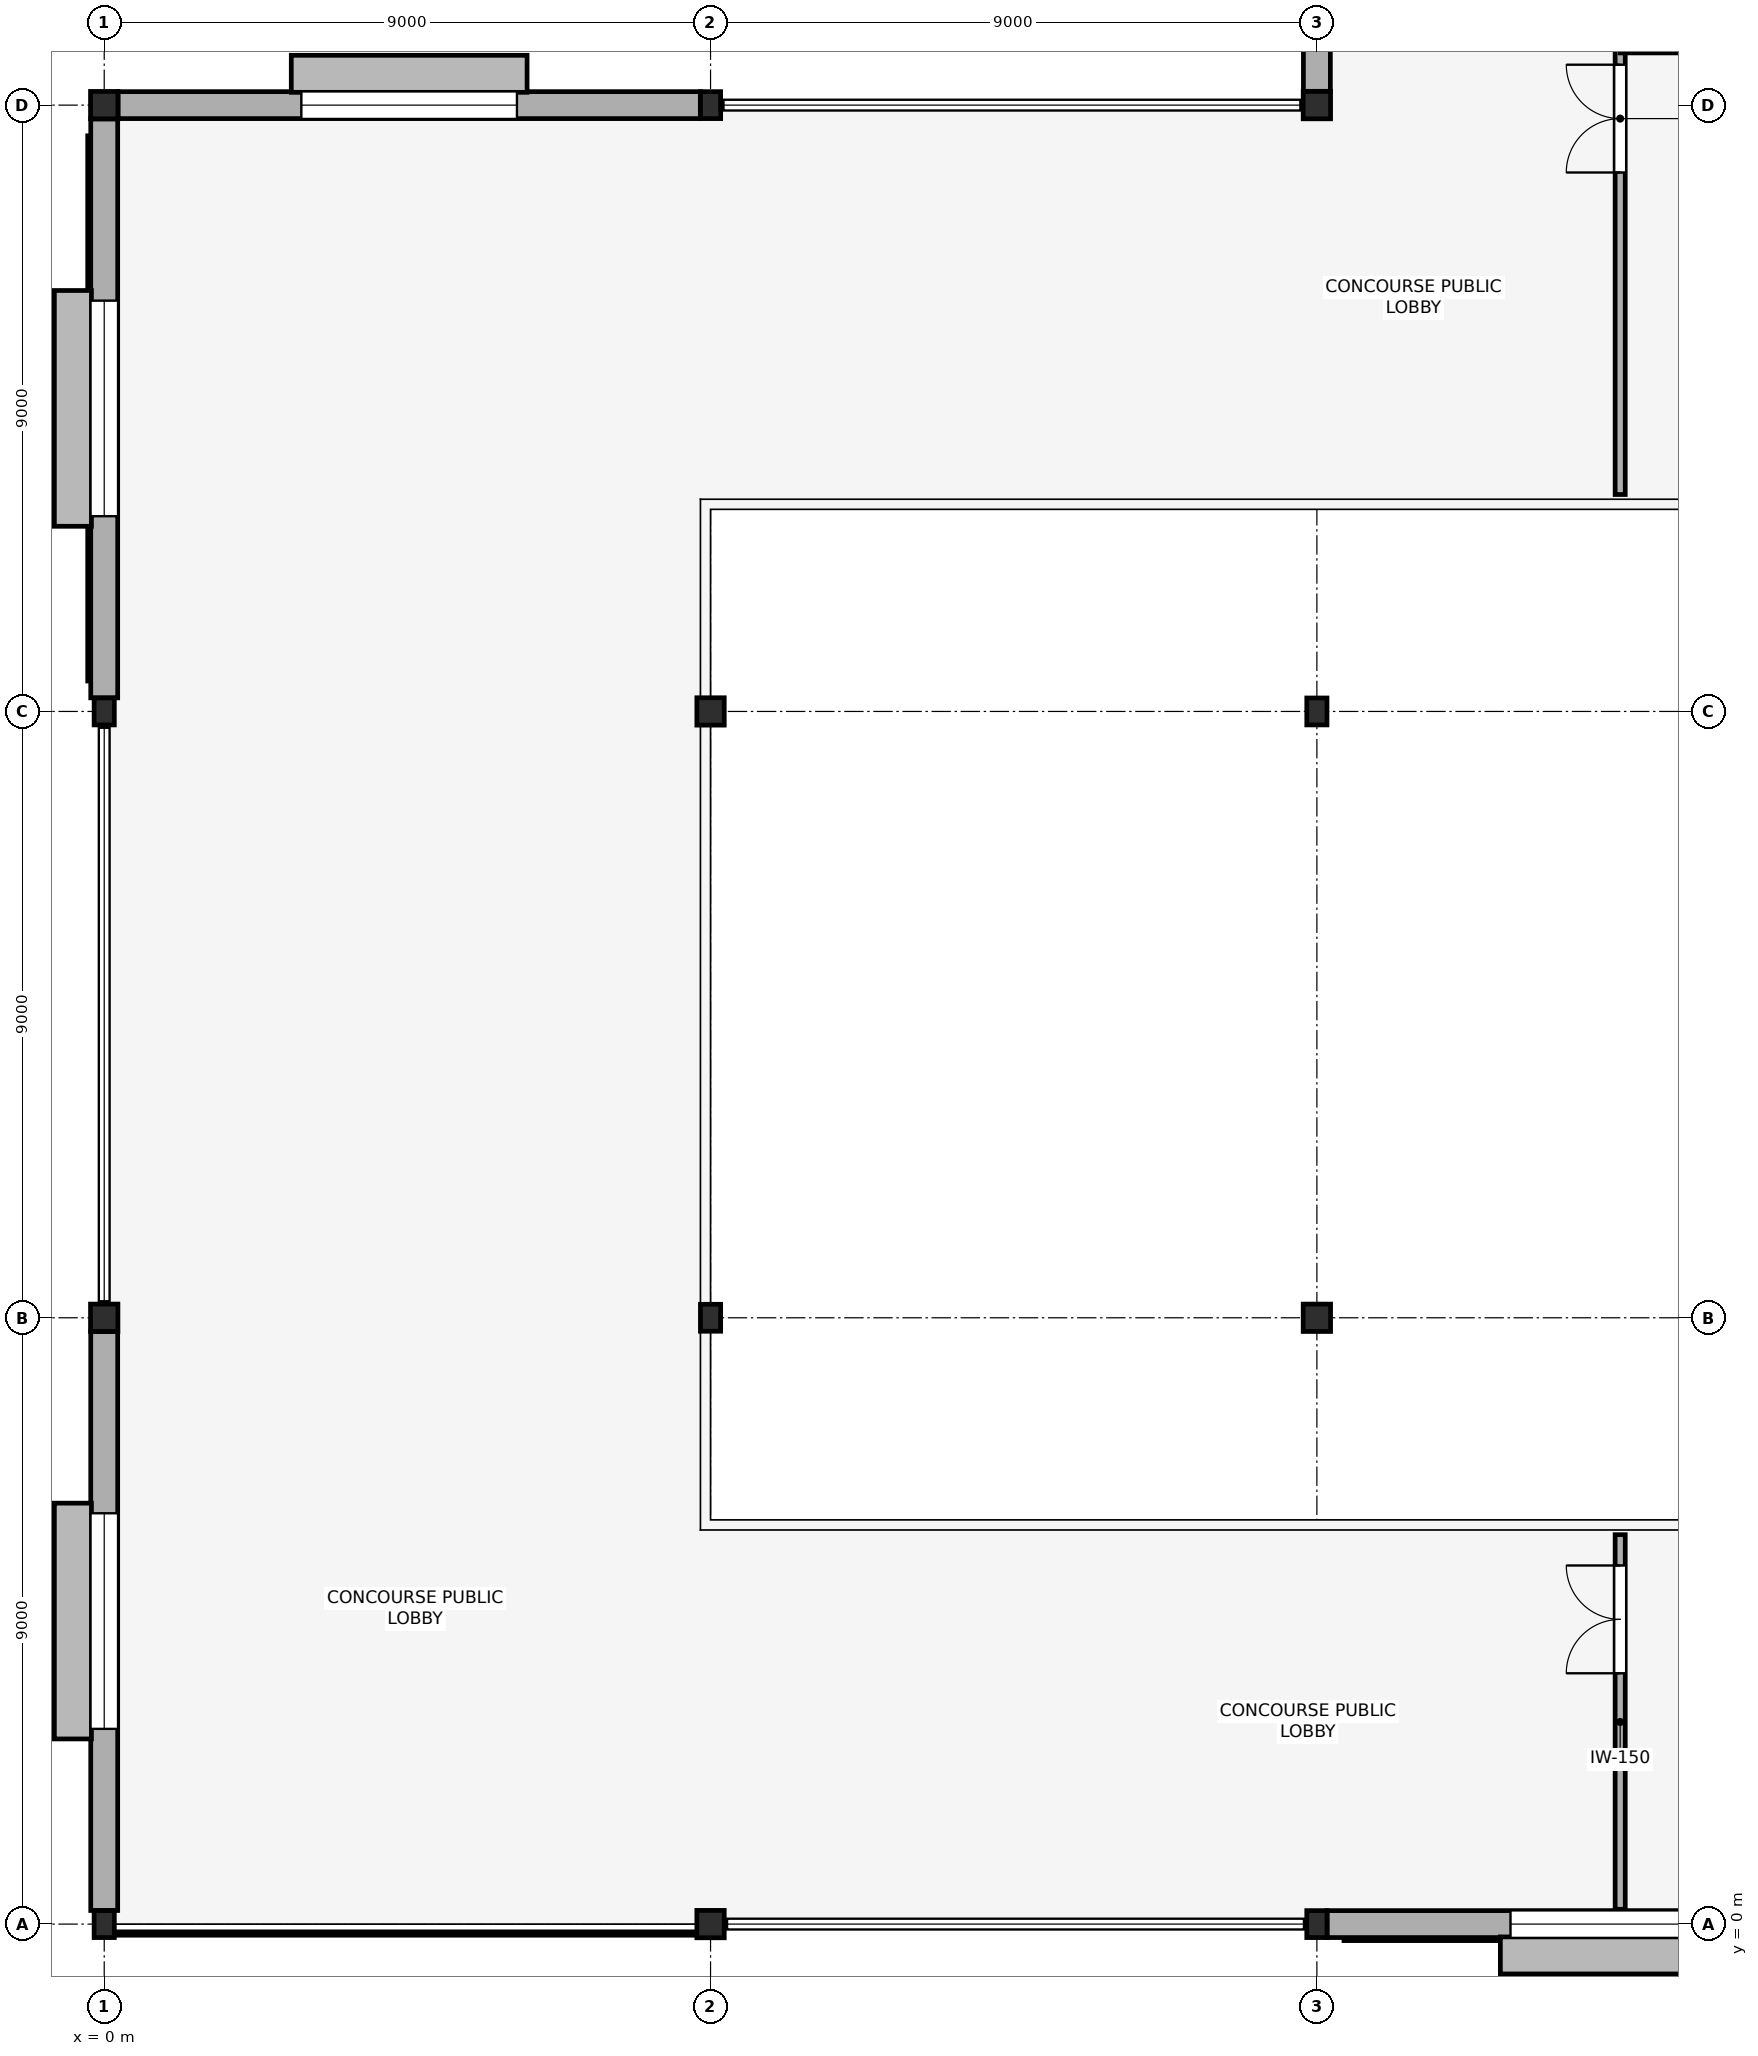
"""IFC4 building model, lengths in metres.
Left out: names, types, materials, properties, quantities, classifications, styles, units other than length and angle.
Written with IfcOpenShell. Run it as: python <this file> out.ifc"""

import sys

from ifc_helpers import new_model, si_unit, direction, frame, frame_2d, origin, origin_with_axes, origin_2d, place, context, subcontext, project, spatial, rectangle, hollow_circle, i_section, extrude, element, fill, save


model = new_model("IFC4")
c1 = context("Model", 3, precision=1e-05, world=origin(), true_north=direction((0.0, 1.0)))
c2 = subcontext(c1, "Body", "Model", "MODEL_VIEW")
j1 = project(units=[si_unit("LENGTHUNIT", "METRE"), si_unit("PLANEANGLEUNIT", "RADIAN")], contexts=[c1])
p1 = place(None, origin())
s1 = spatial("IfcSite", under=j1, at=p1, CompositionType="ELEMENT")
p2 = place(p1, origin())
s2 = spatial("IfcBuilding", under=s1, at=p2, CompositionType="ELEMENT")
p3 = place(p2, frame((0.0, 0.0, 5.4)))
s3 = spatial("IfcBuildingStorey", under=s2, at=p3, CompositionType="ELEMENT", Elevation=5.4)
p4 = place(p3, origin_with_axes())
e1 = element("IfcColumn", 1, at=p4, inside=s3, PredefinedType="COLUMN", context=c2, shape_type="SweptSolid", body=[
    extrude(i_section(OverallWidth=0.3, OverallDepth=0.4, WebThickness=0.013, FlangeThickness=0.024, FilletRadius=0.027, at=origin_2d()), origin(), (0.0, 0.0, 1.0), 4.8),
])
p5 = place(p3, frame((0.0, 9.0, 0.0), z_axis=(0.0, 0.0, 1.0), x_axis=(1.0, 0.0, 0.0)))
e2 = element("IfcColumn", 2, at=p5, inside=s3, PredefinedType="COLUMN", context=c2, shape_type="SweptSolid", body=[
    extrude(hollow_circle(Radius=0.203, WallThickness=0.016, at=origin_2d()), origin(), (0.0, 0.0, 1.0), 4.8),
])
p6 = place(p3, frame((0.0, 18.0, 0.0), z_axis=(0.0, 0.0, 1.0), x_axis=(1.0, 0.0, 0.0)))
e3 = element("IfcColumn", 3, at=p6, inside=s3, PredefinedType="COLUMN", context=c2, shape_type="SweptSolid", body=[
    extrude(i_section(OverallWidth=0.3, OverallDepth=0.4, WebThickness=0.013, FlangeThickness=0.024, FilletRadius=0.027, at=origin_2d()), origin(), (0.0, 0.0, 1.0), 4.8),
])
for number, where, z_axis, x_axis in (
    (4, (0.0, 27.0, 0.0), (0.0, 0.0, 1.0), (1.0, 0.0, 0.0)),
    (5, (9.0, 0.0, 0.0), (0.0, 0.0, 1.0), (1.0, 0.0, 0.0)),
):
    element("IfcColumn", number, at=place(p3, frame(where, z_axis=z_axis, x_axis=x_axis)), inside=s3, PredefinedType="COLUMN", context=c2, shape_type="SweptSolid", body=[
        extrude(hollow_circle(Radius=0.203, WallThickness=0.016, at=origin_2d()), origin(), (0.0, 0.0, 1.0), 4.8),
    ])
p7 = place(p3, frame((9.0, 9.0, 0.0), z_axis=(0.0, 0.0, 1.0), x_axis=(1.0, 0.0, 0.0)))
e6 = element("IfcColumn", 6, at=p7, inside=s3, PredefinedType="COLUMN", context=c2, shape_type="SweptSolid", body=[
    extrude(i_section(OverallWidth=0.3, OverallDepth=0.4, WebThickness=0.013, FlangeThickness=0.024, FilletRadius=0.027, at=origin_2d()), origin(), (0.0, 0.0, 1.0), 4.8),
])
p8 = place(p3, frame((9.0, 18.0, 0.0), z_axis=(0.0, 0.0, 1.0), x_axis=(1.0, 0.0, 0.0)))
e7 = element("IfcColumn", 7, at=p8, inside=s3, PredefinedType="COLUMN", context=c2, shape_type="SweptSolid", body=[
    extrude(hollow_circle(Radius=0.203, WallThickness=0.016, at=origin_2d()), origin(), (0.0, 0.0, 1.0), 4.8),
])
for number, where, z_axis, x_axis in (
    (8, (9.0, 27.0, 0.0), (0.0, 0.0, 1.0), (1.0, 0.0, 0.0)),
    (9, (18.0, 0.0, 0.0), (0.0, 0.0, 1.0), (1.0, 0.0, 0.0)),
):
    element("IfcColumn", number, at=place(p3, frame(where, z_axis=z_axis, x_axis=x_axis)), inside=s3, PredefinedType="COLUMN", context=c2, shape_type="SweptSolid", body=[
        extrude(i_section(OverallWidth=0.3, OverallDepth=0.4, WebThickness=0.013, FlangeThickness=0.024, FilletRadius=0.027, at=origin_2d()), origin(), (0.0, 0.0, 1.0), 4.8),
    ])
p9 = place(p3, frame((18.0, 9.0, 0.0), z_axis=(0.0, 0.0, 1.0), x_axis=(1.0, 0.0, 0.0)))
e10 = element("IfcColumn", 10, at=p9, inside=s3, PredefinedType="COLUMN", context=c2, shape_type="SweptSolid", body=[
    extrude(hollow_circle(Radius=0.203, WallThickness=0.016, at=origin_2d()), origin(), (0.0, 0.0, 1.0), 4.8),
])
p10 = place(p3, frame((18.0, 18.0, 0.0), z_axis=(0.0, 0.0, 1.0), x_axis=(1.0, 0.0, 0.0)))
e11 = element("IfcColumn", 11, at=p10, inside=s3, PredefinedType="COLUMN", context=c2, shape_type="SweptSolid", body=[
    extrude(i_section(OverallWidth=0.3, OverallDepth=0.4, WebThickness=0.013, FlangeThickness=0.024, FilletRadius=0.027, at=origin_2d()), origin(), (0.0, 0.0, 1.0), 4.8),
])
p11 = place(p3, frame((18.0, 27.0, 0.0), z_axis=(0.0, 0.0, 1.0), x_axis=(1.0, 0.0, 0.0)))
e12 = element("IfcColumn", 12, at=p11, inside=s3, PredefinedType="COLUMN", context=c2, shape_type="SweptSolid", body=[
    extrude(hollow_circle(Radius=0.203, WallThickness=0.016, at=origin_2d()), origin(), (0.0, 0.0, 1.0), 4.8),
])
p12 = place(p3, frame((26.795, 0.0, 0.0), z_axis=(0.0, 0.0, 1.0), x_axis=(-1.0, 0.0, 0.0)))
e13 = element("IfcWall", 13, at=p12, inside=s3, PredefinedType="STANDARD", context=c2, shape_type="SweptSolid", body=[
    extrude(rectangle(XDim=8.643, YDim=0.4, at=frame_2d((4.321, 0.0))), origin(), (0.0, 0.0, 1.0), 3.907),
])
p13 = place(p12, frame((2.721, 0.0, 0.95)))
e14 = element("IfcOpeningElement", 14, at=p13, cuts=e13, PredefinedType="OPENING", context=c2, shape_type="SweptSolid", body=[
    extrude(rectangle(XDim=3.2, YDim=1.8, at=frame_2d((1.6, 0.9))), frame((0.0, 0.21, 0.0), z_axis=(0.0, -1.0, 0.0), x_axis=(1.0, 0.0, 0.0)), (0.0, 0.0, 1.0), 0.42),
])
p14 = place(p3, frame((0.0, 0.202, 0.0), z_axis=(0.0, 0.0, 1.0), x_axis=(0.0, 1.0, 0.0)))
e15 = element("IfcWall", 15, at=p14, inside=s3, PredefinedType="STANDARD", context=c2, shape_type="SweptSolid", body=[
    extrude(rectangle(XDim=8.593, YDim=0.4, at=frame_2d((4.296, 0.0))), origin(), (0.0, 0.0, 1.0), 4.215),
])
p15 = place(p14, frame((2.696, 0.0, 0.95)))
e16 = element("IfcOpeningElement", 16, at=p15, cuts=e15, PredefinedType="OPENING", context=c2, shape_type="SweptSolid", body=[
    extrude(rectangle(XDim=3.2, YDim=1.8, at=frame_2d((1.6, 0.9))), frame((0.0, 0.21, 0.0), z_axis=(0.0, -1.0, 0.0), x_axis=(1.0, 0.0, 0.0)), (0.0, 0.0, 1.0), 0.42),
])
p16 = place(p3, frame((0.0, 18.202, 0.0), z_axis=(0.0, 0.0, 1.0), x_axis=(0.0, 1.0, 0.0)))
e17 = element("IfcWall", 17, at=p16, inside=s3, PredefinedType="STANDARD", context=c2, shape_type="SweptSolid", body=[
    extrude(rectangle(XDim=8.593, YDim=0.4, at=frame_2d((4.296, 0.0))), origin(), (0.0, 0.0, 1.0), 4.215),
])
p17 = place(p16, frame((2.696, 0.0, 0.95)))
e18 = element("IfcOpeningElement", 18, at=p17, cuts=e17, PredefinedType="OPENING", context=c2, shape_type="SweptSolid", body=[
    extrude(rectangle(XDim=3.2, YDim=1.8, at=frame_2d((1.6, 0.9))), frame((0.0, 0.21, 0.0), z_axis=(0.0, -1.0, 0.0), x_axis=(1.0, 0.0, 0.0)), (0.0, 0.0, 1.0), 0.42),
])
p18 = place(p3, frame((0.205, 27.0, 0.0), z_axis=(0.0, 0.0, 1.0), x_axis=(1.0, 0.0, 0.0)))
e19 = element("IfcWall", 19, at=p18, inside=s3, PredefinedType="STANDARD", context=c2, shape_type="SweptSolid", body=[
    extrude(rectangle(XDim=8.643, YDim=0.4, at=frame_2d((4.321, 0.0))), origin(), (0.0, 0.0, 1.0), 3.907),
])
p19 = place(p18, frame((2.721, 0.0, 0.95)))
e20 = element("IfcOpeningElement", 20, at=p19, cuts=e19, PredefinedType="OPENING", context=c2, shape_type="SweptSolid", body=[
    extrude(rectangle(XDim=3.2, YDim=1.8, at=frame_2d((1.6, 0.9))), frame((0.0, 0.21, 0.0), z_axis=(0.0, -1.0, 0.0), x_axis=(1.0, 0.0, 0.0)), (0.0, 0.0, 1.0), 0.42),
])
p20 = place(p3, frame((18.0, 27.205, 0.0), z_axis=(0.0, 0.0, 1.0), x_axis=(0.0, 1.0, 0.0)))
e21 = element("IfcWall", 21, at=p20, inside=s3, PredefinedType="STANDARD", context=c2, shape_type="SweptSolid", body=[
    extrude(rectangle(XDim=8.663, YDim=0.4, at=frame_2d((4.332, 0.0))), origin(), (0.0, 0.0, 1.0), 4.215),
])
p21 = place(p20, frame((2.731, 0.0, 0.95)))
e22 = element("IfcOpeningElement", 22, at=p21, cuts=e21, PredefinedType="OPENING", context=c2, shape_type="SweptSolid", body=[
    extrude(rectangle(XDim=3.2, YDim=1.8, at=frame_2d((1.6, 0.9))), frame((0.0, 0.21, 0.0), z_axis=(0.0, -1.0, 0.0), x_axis=(1.0, 0.0, 0.0)), (0.0, 0.0, 1.0), 0.42),
])
p22 = place(p3, frame((22.502, 0.22, 0.0), z_axis=(0.0, 0.0, 1.0), x_axis=(0.0, 1.0, 0.0)))
e23 = element("IfcWall", 23, at=p22, inside=s3, PredefinedType="PARTITIONING", context=c2, shape_type="SweptSolid", body=[
    extrude(rectangle(XDim=5.56, YDim=0.15, at=frame_2d((2.78, 0.0))), origin(), (0.0, 0.0, 1.0), 4.52),
])
p23 = place(p22, frame((3.503, 0.0, 0.0)))
e24 = element("IfcOpeningElement", 24, at=p23, cuts=e23, PredefinedType="OPENING", context=c2, shape_type="SweptSolid", body=[
    extrude(rectangle(XDim=1.6, YDim=2.2, at=frame_2d((0.8, 1.1))), frame((0.0, 0.085, 0.0), z_axis=(0.0, -1.0, 0.0), x_axis=(1.0, 0.0, 0.0)), (0.0, 0.0, 1.0), 0.17),
])
p24 = place(p3, frame((22.502, 21.22, 0.0), z_axis=(0.0, 0.0, 1.0), x_axis=(0.0, 1.0, 0.0)))
e25 = element("IfcWall", 25, at=p24, inside=s3, PredefinedType="PARTITIONING", context=c2, shape_type="SweptSolid", body=[
    extrude(rectangle(XDim=6.63, YDim=0.15, at=frame_2d((3.315, 0.0))), origin(), (0.0, 0.0, 1.0), 4.52),
])
p25 = place(p24, frame((4.78, 0.0, 0.0)))
e26 = element("IfcOpeningElement", 26, at=p25, cuts=e25, PredefinedType="OPENING", context=c2, shape_type="SweptSolid", body=[
    extrude(rectangle(XDim=1.6, YDim=2.2, at=frame_2d((0.8, 1.1))), frame((0.0, 0.085, 0.0), z_axis=(0.0, -1.0, 0.0), x_axis=(1.0, 0.0, 0.0)), (0.0, 0.0, 1.0), 0.17),
])
p26 = place(p3, frame((22.502, 27.85, 0.0), z_axis=(0.0, 0.0, 1.0), x_axis=(1.0, 0.0, 0.0)))
e27 = element("IfcWall", 27, at=p26, inside=s3, PredefinedType="PARTITIONING", context=c2, shape_type="SweptSolid", body=[
    extrude(rectangle(XDim=22.458, YDim=0.15, at=frame_2d((11.229, 0.0))), origin(), (0.0, 0.0, 1.0), 4.52),
])
p27 = place(p13, origin())
e28 = element("IfcWindow", 28, at=p27, inside=s3, PartitioningType="SINGLE_PANEL", PredefinedType="WINDOW", context=c2, shape_type="SweptSolid", body=[
    extrude(rectangle(XDim=3.2, YDim=1.8, at=frame_2d((1.6, 0.9))), frame((0.0, 0.03, 0.0), z_axis=(0.0, -1.0, 0.0), x_axis=(1.0, 0.0, 0.0)), (0.0, 0.0, 1.0), 0.06),
])
fill(e14, e28)
p28 = place(p15, origin())
e29 = element("IfcWindow", 29, at=p28, inside=s3, PartitioningType="SINGLE_PANEL", PredefinedType="WINDOW", context=c2, shape_type="SweptSolid", body=[
    extrude(rectangle(XDim=3.2, YDim=1.8, at=frame_2d((1.6, 0.9))), frame((0.0, 0.03, 0.0), z_axis=(0.0, -1.0, 0.0), x_axis=(1.0, 0.0, 0.0)), (0.0, 0.0, 1.0), 0.06),
])
fill(e16, e29)
p29 = place(p17, origin())
e30 = element("IfcWindow", 30, at=p29, inside=s3, PartitioningType="SINGLE_PANEL", PredefinedType="WINDOW", context=c2, shape_type="SweptSolid", body=[
    extrude(rectangle(XDim=3.2, YDim=1.8, at=frame_2d((1.6, 0.9))), frame((0.0, 0.03, 0.0), z_axis=(0.0, -1.0, 0.0), x_axis=(1.0, 0.0, 0.0)), (0.0, 0.0, 1.0), 0.06),
])
fill(e18, e30)
p30 = place(p19, origin())
e31 = element("IfcWindow", 31, at=p30, inside=s3, PartitioningType="SINGLE_PANEL", PredefinedType="WINDOW", context=c2, shape_type="SweptSolid", body=[
    extrude(rectangle(XDim=3.2, YDim=1.8, at=frame_2d((1.6, 0.9))), frame((0.0, 0.03, 0.0), z_axis=(0.0, -1.0, 0.0), x_axis=(1.0, 0.0, 0.0)), (0.0, 0.0, 1.0), 0.06),
])
fill(e20, e31)
p31 = place(p25, origin())
e32 = element("IfcDoor", 32, at=p31, inside=s3, OperationType="DOUBLE_DOOR_SINGLE_SWING", PredefinedType="DOOR", context=c2, shape_type="SweptSolid", body=[
    extrude(rectangle(XDim=1.6, YDim=2.2, at=frame_2d((0.8, 1.1))), frame((0.0, 0.025, 0.0), z_axis=(0.0, -1.0, 0.0), x_axis=(1.0, 0.0, 0.0)), (0.0, 0.0, 1.0), 0.05),
])
fill(e26, e32)
p32 = place(p23, origin())
e33 = element("IfcDoor", 33, at=p32, inside=s3, OperationType="DOUBLE_DOOR_SINGLE_SWING", PredefinedType="DOOR", context=c2, shape_type="SweptSolid", body=[
    extrude(rectangle(XDim=1.6, YDim=2.2, at=frame_2d((0.8, 1.1))), frame((0.0, 0.025, 0.0), z_axis=(0.0, -1.0, 0.0), x_axis=(1.0, 0.0, 0.0)), (0.0, 0.0, 1.0), 0.05),
])
fill(e24, e33)
save(model, sys.argv[1])
